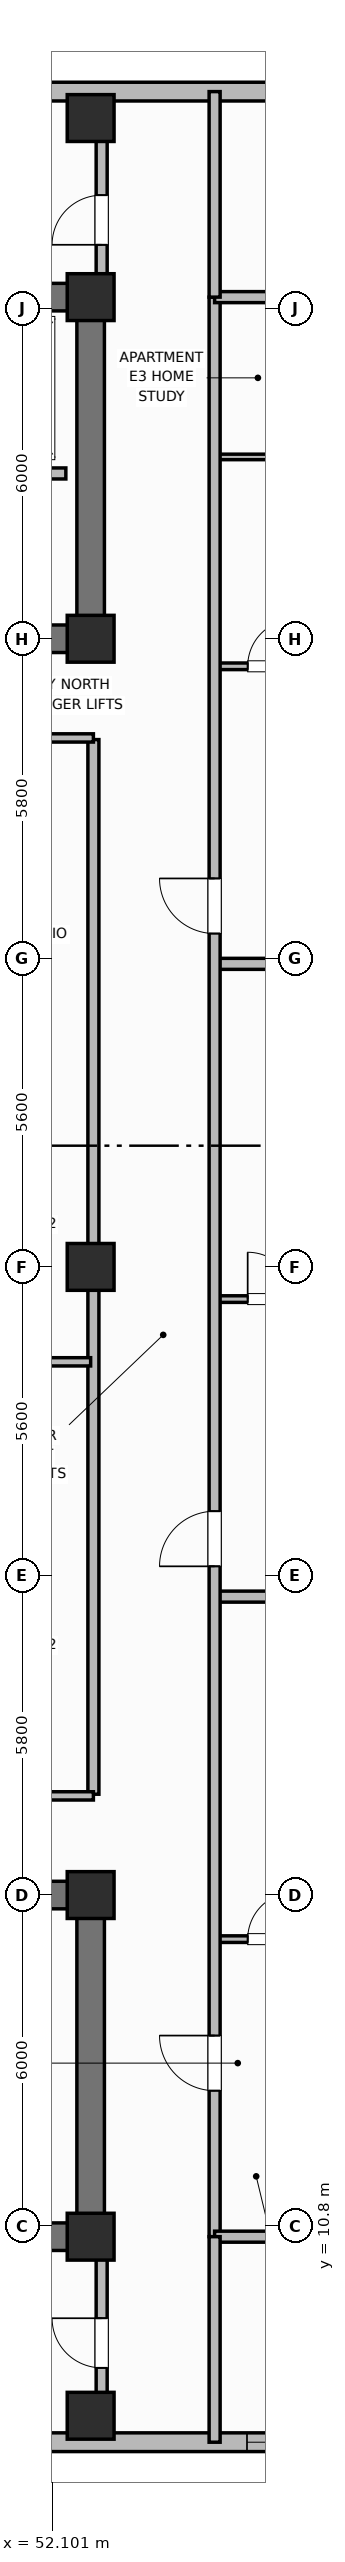
"""IFC4 building model, lengths in metres.
Left out: names, types, materials, properties, quantities, classifications, styles, units other than length and angle.
Written with IfcOpenShell. Run it as: python <this file> out.ifc"""

import sys

from ifc_helpers import new_model, si_unit, direction, frame, frame_2d, origin, origin_2d, place, context, subcontext, project, spatial, rectangle, extrude, element, fill, save


model = new_model("IFC4")
c1 = context("Model", 3, precision=1e-05, world=origin(), true_north=direction((0.0, 1.0)))
c2 = subcontext(c1, "Body", "Model", "MODEL_VIEW")
j1 = project(units=[si_unit("LENGTHUNIT", "METRE"), si_unit("PLANEANGLEUNIT", "RADIAN")], contexts=[c1])
p1 = place(None, origin())
s1 = spatial("IfcSite", under=j1, at=p1, CompositionType="ELEMENT")
p2 = place(p1, origin())
s2 = spatial("IfcBuilding", under=s1, at=p2, CompositionType="ELEMENT")
p3 = place(p2, frame((0.0, 0.0, 207.3)))
s3 = spatial("IfcBuildingStorey", under=s2, at=p3, CompositionType="ELEMENT", Elevation=207.3)
p4 = place(p3, frame((52.8, 10.6, 0.0), z_axis=(0.0, 0.0, 1.0), x_axis=(-1.0, 0.0, 0.0)))
e1 = element("IfcWall", 1, at=p4, inside=s3, PredefinedType="SHEAR", context=c2, shape_type="SweptSolid", body=[
    extrude(rectangle(XDim=27.2, YDim=0.5, at=frame_2d((13.6, 0.0))), origin(), (0.0, 0.0, 1.0), 3.7),
])
p5 = place(p3, frame((52.8, 10.85, 0.0), z_axis=(0.0, 0.0, 1.0), x_axis=(0.0, 1.0, 0.0)))
e2 = element("IfcWall", 2, at=p5, inside=s3, PredefinedType="SHEAR", context=c2, shape_type="SweptSolid", body=[
    extrude(rectangle(XDim=5.7, YDim=0.5, at=frame_2d((2.85, 0.0))), origin(), (0.0, 0.0, 1.0), 3.7),
])
p6 = place(p3, frame((25.6, 16.8, 0.0), z_axis=(0.0, 0.0, 1.0), x_axis=(1.0, 0.0, 0.0)))
e3 = element("IfcWall", 3, at=p6, inside=s3, PredefinedType="SHEAR", context=c2, shape_type="SweptSolid", body=[
    extrude(rectangle(XDim=27.2, YDim=0.5, at=frame_2d((13.6, 0.0))), origin(), (0.0, 0.0, 1.0), 3.7),
])
p7 = place(p6, frame((1.9, 0.0, 0.0)))
e4 = element("IfcOpeningElement", 4, at=p7, cuts=e3, PredefinedType="OPENING", context=c2, shape_type="SweptSolid", body=[
    extrude(rectangle(XDim=1.1, YDim=2.15, at=frame_2d((0.55, 1.075))), frame((0.0, 0.26, 0.0), z_axis=(0.0, -1.0, 0.0), x_axis=(1.0, 0.0, 0.0)), (0.0, 0.0, 1.0), 0.52),
])
p8 = place(p6, frame((13.0, 0.0, 0.0)))
e5 = element("IfcOpeningElement", 5, at=p8, cuts=e3, PredefinedType="OPENING", context=c2, shape_type="SweptSolid", body=[
    extrude(rectangle(XDim=1.2, YDim=2.15, at=frame_2d((0.6, 1.075))), frame((0.0, 0.26, 0.0), z_axis=(0.0, -1.0, 0.0), x_axis=(1.0, 0.0, 0.0)), (0.0, 0.0, 1.0), 0.52),
])
p9 = place(p6, frame((21.6, 0.0, 0.0)))
e6 = element("IfcOpeningElement", 6, at=p9, cuts=e3, PredefinedType="OPENING", context=c2, shape_type="SweptSolid", body=[
    extrude(rectangle(XDim=1.0, YDim=2.15, at=frame_2d((0.5, 1.075))), frame((0.0, 0.26, 0.0), z_axis=(0.0, -1.0, 0.0), x_axis=(1.0, 0.0, 0.0)), (0.0, 0.0, 1.0), 0.52),
])
p10 = place(p3, frame((25.6, 45.8, 0.0), z_axis=(0.0, 0.0, 1.0), x_axis=(1.0, 0.0, 0.0)))
e7 = element("IfcWall", 7, at=p10, inside=s3, PredefinedType="SHEAR", context=c2, shape_type="SweptSolid", body=[
    extrude(rectangle(XDim=27.2, YDim=0.5, at=frame_2d((13.6, 0.0))), origin(), (0.0, 0.0, 1.0), 3.7),
])
p11 = place(p3, frame((52.8, 39.85, 0.0), z_axis=(0.0, 0.0, 1.0), x_axis=(0.0, 1.0, 0.0)))
e8 = element("IfcWall", 8, at=p11, inside=s3, PredefinedType="SHEAR", context=c2, shape_type="SweptSolid", body=[
    extrude(rectangle(XDim=5.7, YDim=0.5, at=frame_2d((2.85, 0.0))), origin(), (0.0, 0.0, 1.0), 3.7),
])
p12 = place(p3, frame((52.8, 39.6, 0.0), z_axis=(0.0, 0.0, 1.0), x_axis=(-1.0, 0.0, 0.0)))
e9 = element("IfcWall", 9, at=p12, inside=s3, PredefinedType="SHEAR", context=c2, shape_type="SweptSolid", body=[
    extrude(rectangle(XDim=27.2, YDim=0.5, at=frame_2d((13.6, 0.0))), origin(), (0.0, 0.0, 1.0), 3.7),
])
p13 = place(p12, frame((24.2, 0.0, 0.0)))
e10 = element("IfcOpeningElement", 10, at=p13, cuts=e9, PredefinedType="OPENING", context=c2, shape_type="SweptSolid", body=[
    extrude(rectangle(XDim=1.1, YDim=2.15, at=frame_2d((0.55, 1.075))), frame((0.0, 0.26, 0.0), z_axis=(0.0, -1.0, 0.0), x_axis=(1.0, 0.0, 0.0)), (0.0, 0.0, 1.0), 0.52),
])
p14 = place(p12, frame((15.1, 0.0, 0.0)))
e11 = element("IfcOpeningElement", 11, at=p14, cuts=e9, PredefinedType="OPENING", context=c2, shape_type="SweptSolid", body=[
    extrude(rectangle(XDim=1.2, YDim=2.15, at=frame_2d((0.6, 1.075))), frame((0.0, 0.26, 0.0), z_axis=(0.0, -1.0, 0.0), x_axis=(1.0, 0.0, 0.0)), (0.0, 0.0, 1.0), 0.52),
])
p15 = place(p12, frame((11.6, 0.0, 0.0)))
e12 = element("IfcOpeningElement", 12, at=p15, cuts=e9, PredefinedType="OPENING", context=c2, shape_type="SweptSolid", body=[
    extrude(rectangle(XDim=0.9, YDim=2.1, at=frame_2d((0.45, 1.05))), frame((0.0, 0.26, 0.0), z_axis=(0.0, -1.0, 0.0), x_axis=(1.0, 0.0, 0.0)), (0.0, 0.0, 1.0), 0.52),
])
p16 = place(p12, frame((7.35, 0.0, 0.0)))
e13 = element("IfcOpeningElement", 13, at=p16, cuts=e9, PredefinedType="OPENING", context=c2, shape_type="SweptSolid", body=[
    extrude(rectangle(XDim=0.85, YDim=2.1, at=frame_2d((0.425, 1.05))), frame((0.0, 0.26, 0.0), z_axis=(0.0, -1.0, 0.0), x_axis=(1.0, 0.0, 0.0)), (0.0, 0.0, 1.0), 0.52),
])
p17 = place(p12, frame((4.2, 0.0, 0.0)))
e14 = element("IfcOpeningElement", 14, at=p17, cuts=e9, PredefinedType="OPENING", context=c2, shape_type="SweptSolid", body=[
    extrude(rectangle(XDim=1.3, YDim=2.2, at=frame_2d((0.65, 1.1))), frame((0.0, 0.26, 0.0), z_axis=(0.0, -1.0, 0.0), x_axis=(1.0, 0.0, 0.0)), (0.0, 0.0, 1.0), 0.52),
])
for number, where, z_axis, x_axis in (
    (15, (52.8, 10.6, 0.0), (0.0, 0.0, 1.0), (1.0, 0.0, 0.0)),
    (16, (52.8, 16.8, 0.0), (0.0, 0.0, 1.0), (1.0, 0.0, 0.0)),
    (17, (52.8, 39.6, 0.0), (0.0, 0.0, 1.0), (1.0, 0.0, 0.0)),
    (18, (52.8, 45.8, 0.0), (0.0, 0.0, 1.0), (1.0, 0.0, 0.0)),
    (19, (52.8, 28.2, 0.0), (0.0, 0.0, 1.0), (1.0, 0.0, 0.0)),
    (20, (52.8, 7.35, 0.0), (0.0, 0.0, 1.0), (1.0, 0.0, 0.0)),
    (21, (52.8, 49.05, 0.0), (0.0, 0.0, 1.0), (1.0, 0.0, 0.0)),
):
    element("IfcColumn", number, at=place(p3, frame(where, z_axis=z_axis, x_axis=x_axis)), inside=s3, PredefinedType="COLUMN", context=c2, shape_type="SweptSolid", body=[
        extrude(rectangle(XDim=0.85, YDim=0.85, at=origin_2d()), origin(), (0.0, 0.0, 1.0), 3.7),
    ])
p18 = place(p3, frame((42.4, 6.87, 0.0), z_axis=(0.0, 0.0, 1.0), x_axis=(1.0, 0.0, 0.0)))
e22 = element("IfcWall", 22, at=p18, inside=s3, PredefinedType="SOLIDWALL", context=c2, shape_type="SweptSolid", body=[
    extrude(rectangle(XDim=15.8, YDim=0.34, at=frame_2d((7.9, 0.0))), origin(), (0.0, 0.0, 1.0), 2.72),
])
p19 = place(p18, frame((2.363, 0.0, 0.7)))
e23 = element("IfcOpeningElement", 23, at=p19, cuts=e22, PredefinedType="OPENING", context=c2, shape_type="SweptSolid", body=[
    extrude(rectangle(XDim=1.6, YDim=1.9, at=frame_2d((0.8, 0.95))), frame((0.0, 0.18, 0.0), z_axis=(0.0, -1.0, 0.0), x_axis=(1.0, 0.0, 0.0)), (0.0, 0.0, 1.0), 0.36),
])
p20 = place(p18, frame((5.288, 0.0, 0.7)))
e24 = element("IfcOpeningElement", 24, at=p20, cuts=e22, PredefinedType="OPENING", context=c2, shape_type="SweptSolid", body=[
    extrude(rectangle(XDim=1.6, YDim=1.9, at=frame_2d((0.8, 0.95))), frame((0.0, 0.18, 0.0), z_axis=(0.0, -1.0, 0.0), x_axis=(1.0, 0.0, 0.0)), (0.0, 0.0, 1.0), 0.36),
])
p21 = place(p18, frame((13.238, 0.0, 0.7)))
e25 = element("IfcOpeningElement", 25, at=p21, cuts=e22, PredefinedType="OPENING", context=c2, shape_type="SweptSolid", body=[
    extrude(rectangle(XDim=1.6, YDim=1.9, at=frame_2d((0.8, 0.95))), frame((0.0, 0.18, 0.0), z_axis=(0.0, -1.0, 0.0), x_axis=(1.0, 0.0, 0.0)), (0.0, 0.0, 1.0), 0.36),
])
p22 = place(p3, frame((58.2, 49.53, 0.0), z_axis=(0.0, 0.0, 1.0), x_axis=(-1.0, 0.0, 0.0)))
e26 = element("IfcWall", 26, at=p22, inside=s3, PredefinedType="SOLIDWALL", context=c2, shape_type="SweptSolid", body=[
    extrude(rectangle(XDim=15.8, YDim=0.34, at=frame_2d((7.9, 0.0))), origin(), (0.0, 0.0, 1.0), 2.72),
])
p23 = place(p22, frame((7.962, 0.0, 0.7)))
e27 = element("IfcOpeningElement", 27, at=p23, cuts=e26, PredefinedType="OPENING", context=c2, shape_type="SweptSolid", body=[
    extrude(rectangle(XDim=2.1, YDim=1.9, at=frame_2d((1.05, 0.95))), frame((0.0, 0.18, 0.0), z_axis=(0.0, -1.0, 0.0), x_axis=(1.0, 0.0, 0.0)), (0.0, 0.0, 1.0), 0.36),
])
p24 = place(p22, frame((11.587, 0.0, 0.7)))
e28 = element("IfcOpeningElement", 28, at=p24, cuts=e26, PredefinedType="OPENING", context=c2, shape_type="SweptSolid", body=[
    extrude(rectangle(XDim=2.1, YDim=1.9, at=frame_2d((1.05, 0.95))), frame((0.0, 0.18, 0.0), z_axis=(0.0, -1.0, 0.0), x_axis=(1.0, 0.0, 0.0)), (0.0, 0.0, 1.0), 0.36),
])
p25 = place(p3, frame((52.35, 42.6, 0.0), z_axis=(0.0, 0.0, 1.0), x_axis=(-1.0, 0.0, 0.0)))
e29 = element("IfcWall", 29, at=p25, inside=s3, PredefinedType="PARTITIONING", context=c2, shape_type="SweptSolid", body=[
    extrude(rectangle(XDim=6.5, YDim=0.2, at=frame_2d((3.25, 0.0))), origin(), (0.0, 0.0, 1.0), 2.55),
])
p26 = place(p25, frame((4.9, 0.0, 0.0)))
e30 = element("IfcOpeningElement", 30, at=p26, cuts=e29, PredefinedType="OPENING", context=c2, shape_type="SweptSolid", body=[
    extrude(rectangle(XDim=1.0, YDim=2.15, at=frame_2d((0.5, 1.075))), frame((0.0, 0.11, 0.0), z_axis=(0.0, -1.0, 0.0), x_axis=(1.0, 0.0, 0.0)), (0.0, 0.0, 1.0), 0.22),
])
p27 = place(p25, frame((2.8, 0.0, 0.0)))
e31 = element("IfcOpeningElement", 31, at=p27, cuts=e29, PredefinedType="OPENING", context=c2, shape_type="SweptSolid", body=[
    extrude(rectangle(XDim=1.0, YDim=2.15, at=frame_2d((0.5, 1.075))), frame((0.0, 0.11, 0.0), z_axis=(0.0, -1.0, 0.0), x_axis=(1.0, 0.0, 0.0)), (0.0, 0.0, 1.0), 0.22),
])
p28 = place(p25, frame((0.7, 0.0, 0.0)))
e32 = element("IfcOpeningElement", 32, at=p28, cuts=e29, PredefinedType="OPENING", context=c2, shape_type="SweptSolid", body=[
    extrude(rectangle(XDim=1.0, YDim=2.15, at=frame_2d((0.5, 1.075))), frame((0.0, 0.11, 0.0), z_axis=(0.0, -1.0, 0.0), x_axis=(1.0, 0.0, 0.0)), (0.0, 0.0, 1.0), 0.22),
])
p29 = place(p3, frame((52.85, 18.63, 0.0), z_axis=(0.0, 0.0, 1.0), x_axis=(0.0, 1.0, 0.0)))
e33 = element("IfcWall", 33, at=p29, inside=s3, PredefinedType="PARTITIONING", context=c2, shape_type="SweptSolid", body=[
    extrude(rectangle(XDim=19.14, YDim=0.2, at=frame_2d((9.57, 0.0))), origin(), (0.0, 0.0, 1.0), 2.55),
])
for number, where, z_axis, x_axis in (
    (34, (50.05, 18.6, 0.0), (0.0, 0.0, 1.0), (1.0, 0.0, 0.0)),
    (35, (50.05, 37.8, 0.0), (0.0, 0.0, 1.0), (1.0, 0.0, 0.0)),
):
    element("IfcWall", number, at=place(p3, frame(where, z_axis=z_axis, x_axis=x_axis)), inside=s3, PredefinedType="PARTITIONING", context=c2, shape_type="SweptSolid", body=[
        extrude(rectangle(XDim=2.8, YDim=0.15, at=frame_2d((1.4, 0.0))), origin(), (0.0, 0.0, 1.0), 2.55),
    ])
p30 = place(p3, frame((50.08, 26.477, 0.0), z_axis=(0.0, 0.0, 1.0), x_axis=(1.0, 0.0, 0.0)))
e36 = element("IfcWall", 36, at=p30, inside=s3, PredefinedType="PARTITIONING", context=c2, shape_type="SweptSolid", body=[
    extrude(rectangle(XDim=2.72, YDim=0.15, at=frame_2d((1.36, 0.0))), origin(), (0.0, 0.0, 1.0), 2.55),
])
p31 = place(p3, frame((55.05, 16.0, 0.0), z_axis=(0.0, 0.0, 1.0), x_axis=(1.0, 0.0, 0.0)))
e37 = element("IfcWall", 37, at=p31, inside=s3, PredefinedType="PARTITIONING", context=c2, shape_type="SweptSolid", body=[
    extrude(rectangle(XDim=2.25, YDim=0.12, at=frame_2d((1.125, 0.0))), origin(), (0.0, 0.0, 1.0), 2.55),
])
p32 = place(p31, frame((0.6, 0.0, 0.0)))
e38 = element("IfcOpeningElement", 38, at=p32, cuts=e37, PredefinedType="OPENING", context=c2, shape_type="SweptSolid", body=[
    extrude(rectangle(XDim=0.85, YDim=2.1, at=frame_2d((0.425, 1.05))), frame((0.0, 0.07, 0.0), z_axis=(0.0, -1.0, 0.0), x_axis=(1.0, 0.0, 0.0)), (0.0, 0.0, 1.0), 0.14),
])
p33 = place(p3, frame((55.05, 22.216, 0.0), z_axis=(0.0, 0.0, 1.0), x_axis=(1.0, 0.0, 0.0)))
e39 = element("IfcWall", 39, at=p33, inside=s3, PredefinedType="PARTITIONING", context=c2, shape_type="SweptSolid", body=[
    extrude(rectangle(XDim=6.78, YDim=0.2, at=frame_2d((3.39, 0.0))), origin(), (0.0, 0.0, 1.0), 2.55),
])
p34 = place(p3, frame((55.05, 27.616, 0.0), z_axis=(0.0, 0.0, 1.0), x_axis=(1.0, 0.0, 0.0)))
e40 = element("IfcWall", 40, at=p34, inside=s3, PredefinedType="PARTITIONING", context=c2, shape_type="SweptSolid", body=[
    extrude(rectangle(XDim=2.25, YDim=0.12, at=frame_2d((1.125, 0.0))), origin(), (0.0, 0.0, 1.0), 2.55),
])
p35 = place(p34, frame((0.6, 0.0, 0.0)))
e41 = element("IfcOpeningElement", 41, at=p35, cuts=e40, PredefinedType="OPENING", context=c2, shape_type="SweptSolid", body=[
    extrude(rectangle(XDim=0.85, YDim=2.1, at=frame_2d((0.425, 1.05))), frame((0.0, 0.07, 0.0), z_axis=(0.0, -1.0, 0.0), x_axis=(1.0, 0.0, 0.0)), (0.0, 0.0, 1.0), 0.14),
])
p36 = place(p3, frame((55.05, 33.7, 0.0), z_axis=(0.0, 0.0, 1.0), x_axis=(1.0, 0.0, 0.0)))
e42 = element("IfcWall", 42, at=p36, inside=s3, PredefinedType="PARTITIONING", context=c2, shape_type="SweptSolid", body=[
    extrude(rectangle(XDim=6.78, YDim=0.2, at=frame_2d((3.39, 0.0))), origin(), (0.0, 0.0, 1.0), 2.55),
])
p37 = place(p3, frame((55.05, 39.1, 0.0), z_axis=(0.0, 0.0, 1.0), x_axis=(1.0, 0.0, 0.0)))
e43 = element("IfcWall", 43, at=p37, inside=s3, PredefinedType="PARTITIONING", context=c2, shape_type="SweptSolid", body=[
    extrude(rectangle(XDim=2.25, YDim=0.12, at=frame_2d((1.125, 0.0))), origin(), (0.0, 0.0, 1.0), 2.55),
])
p38 = place(p37, frame((0.6, 0.0, 0.0)))
e44 = element("IfcOpeningElement", 44, at=p38, cuts=e43, PredefinedType="OPENING", context=c2, shape_type="SweptSolid", body=[
    extrude(rectangle(XDim=0.85, YDim=2.1, at=frame_2d((0.425, 1.05))), frame((0.0, 0.07, 0.0), z_axis=(0.0, -1.0, 0.0), x_axis=(1.0, 0.0, 0.0)), (0.0, 0.0, 1.0), 0.14),
])
p39 = place(p3, frame((55.05, 42.9, 0.0), z_axis=(0.0, 0.0, 1.0), x_axis=(1.0, 0.0, 0.0)))
e45 = element("IfcWall", 45, at=p39, inside=s3, PredefinedType="PARTITIONING", context=c2, shape_type="SweptSolid", body=[
    extrude(rectangle(XDim=2.25, YDim=0.1, at=frame_2d((1.125, 0.0))), origin(), (0.0, 0.0, 1.0), 2.55),
])
p40 = place(p3, frame((55.05, 10.6, 0.0), z_axis=(0.0, 0.0, 1.0), x_axis=(0.0, 1.0, 0.0)))
e46 = element("IfcWall", 46, at=p40, inside=s3, PredefinedType="PARTITIONING", context=c2, shape_type="SweptSolid", body=[
    extrude(rectangle(XDim=35.2, YDim=0.2, at=frame_2d((17.6, 0.0))), origin(), (0.0, 0.0, 1.0), 2.55),
])
p41 = place(p40, frame((2.65, 0.0, 0.0)))
e47 = element("IfcOpeningElement", 47, at=p41, cuts=e46, PredefinedType="OPENING", context=c2, shape_type="SweptSolid", body=[
    extrude(rectangle(XDim=1.0, YDim=2.15, at=frame_2d((0.5, 1.075))), frame((0.0, 0.11, 0.0), z_axis=(0.0, -1.0, 0.0), x_axis=(1.0, 0.0, 0.0)), (0.0, 0.0, 1.0), 0.22),
])
p42 = place(p40, frame((12.166, 0.0, 0.0)))
e48 = element("IfcOpeningElement", 48, at=p42, cuts=e46, PredefinedType="OPENING", context=c2, shape_type="SweptSolid", body=[
    extrude(rectangle(XDim=1.0, YDim=2.15, at=frame_2d((0.5, 1.075))), frame((0.0, 0.11, 0.0), z_axis=(0.0, -1.0, 0.0), x_axis=(1.0, 0.0, 0.0)), (0.0, 0.0, 1.0), 0.22),
])
p43 = place(p40, frame((23.65, 0.0, 0.0)))
e49 = element("IfcOpeningElement", 49, at=p43, cuts=e46, PredefinedType="OPENING", context=c2, shape_type="SweptSolid", body=[
    extrude(rectangle(XDim=1.0, YDim=2.15, at=frame_2d((0.5, 1.075))), frame((0.0, 0.11, 0.0), z_axis=(0.0, -1.0, 0.0), x_axis=(1.0, 0.0, 0.0)), (0.0, 0.0, 1.0), 0.22),
])
for number, where, z_axis, x_axis in (
    (50, (55.05, 10.6, 0.0), (0.0, 0.0, 1.0), (1.0, 0.0, 0.0)),
    (51, (55.05, 45.8, 0.0), (0.0, 0.0, 1.0), (1.0, 0.0, 0.0)),
):
    element("IfcWall", number, at=place(p3, frame(where, z_axis=z_axis, x_axis=x_axis)), inside=s3, PredefinedType="PARTITIONING", context=c2, shape_type="SweptSolid", body=[
        extrude(rectangle(XDim=6.36, YDim=0.2, at=frame_2d((3.18, 0.0))), origin(), (0.0, 0.0, 1.0), 2.55),
    ])
for number, where, z_axis, x_axis in (
    (52, (55.05, 6.87, 0.0), (0.0, 0.0, 1.0), (0.0, 1.0, 0.0)),
    (53, (55.05, 45.8, 0.0), (0.0, 0.0, 1.0), (0.0, 1.0, 0.0)),
):
    element("IfcWall", number, at=place(p3, frame(where, z_axis=z_axis, x_axis=x_axis)), inside=s3, PredefinedType="PARTITIONING", context=c2, shape_type="SweptSolid", body=[
        extrude(rectangle(XDim=3.73, YDim=0.2, at=frame_2d((1.865, 0.0))), origin(), (0.0, 0.0, 1.0), 2.55),
    ])
p44 = place(p3, frame((53.0, 7.57, 0.0), z_axis=(0.0, 0.0, 1.0), x_axis=(0.0, 1.0, 0.0)))
e54 = element("IfcWall", 54, at=p44, inside=s3, PredefinedType="PARTITIONING", context=c2, shape_type="SweptSolid", body=[
    extrude(rectangle(XDim=2.73, YDim=0.2, at=frame_2d((1.365, 0.0))), origin(), (0.0, 0.0, 1.0), 2.55),
])
p45 = place(p44, frame((0.65, 0.0, 0.0)))
e55 = element("IfcOpeningElement", 55, at=p45, cuts=e54, PredefinedType="OPENING", context=c2, shape_type="SweptSolid", body=[
    extrude(rectangle(XDim=0.9, YDim=2.1, at=frame_2d((0.45, 1.05))), frame((0.0, 0.11, 0.0), z_axis=(0.0, -1.0, 0.0), x_axis=(1.0, 0.0, 0.0)), (0.0, 0.0, 1.0), 0.22),
])
p46 = place(p3, frame((53.0, 46.1, 0.0), z_axis=(0.0, 0.0, 1.0), x_axis=(0.0, 1.0, 0.0)))
e56 = element("IfcWall", 56, at=p46, inside=s3, PredefinedType="PARTITIONING", context=c2, shape_type="SweptSolid", body=[
    extrude(rectangle(XDim=2.73, YDim=0.2, at=frame_2d((1.365, 0.0))), origin(), (0.0, 0.0, 1.0), 2.55),
])
p47 = place(p46, frame((0.65, 0.0, 0.0)))
e57 = element("IfcOpeningElement", 57, at=p47, cuts=e56, PredefinedType="OPENING", context=c2, shape_type="SweptSolid", body=[
    extrude(rectangle(XDim=0.9, YDim=2.1, at=frame_2d((0.45, 1.05))), frame((0.0, 0.11, 0.0), z_axis=(0.0, -1.0, 0.0), x_axis=(1.0, 0.0, 0.0)), (0.0, 0.0, 1.0), 0.22),
])
p48 = place(p21, origin())
e58 = element("IfcWindow", 58, at=p48, inside=s3, PartitioningType="SINGLE_PANEL", PredefinedType="WINDOW", context=c2, shape_type="SweptSolid", body=[
    extrude(rectangle(XDim=1.6, YDim=1.9, at=frame_2d((0.8, 0.95))), frame((0.0, 0.03, 0.0), z_axis=(0.0, -1.0, 0.0), x_axis=(1.0, 0.0, 0.0)), (0.0, 0.0, 1.0), 0.06),
])
fill(e25, e58)
p49 = place(p32, origin())
e59 = element("IfcDoor", 59, at=p49, inside=s3, OperationType="SINGLE_SWING_RIGHT", PredefinedType="DOOR", context=c2, shape_type="SweptSolid", body=[
    extrude(rectangle(XDim=0.85, YDim=2.1, at=frame_2d((0.425, 1.05))), frame((0.0, 0.025, 0.0), z_axis=(0.0, -1.0, 0.0), x_axis=(1.0, 0.0, 0.0)), (0.0, 0.0, 1.0), 0.05),
])
fill(e38, e59)
p50 = place(p35, origin())
e60 = element("IfcDoor", 60, at=p50, inside=s3, OperationType="SINGLE_SWING_LEFT", PredefinedType="DOOR", context=c2, shape_type="SweptSolid", body=[
    extrude(rectangle(XDim=0.85, YDim=2.1, at=frame_2d((0.425, 1.05))), frame((0.0, 0.025, 0.0), z_axis=(0.0, -1.0, 0.0), x_axis=(1.0, 0.0, 0.0)), (0.0, 0.0, 1.0), 0.05),
])
fill(e41, e60)
p51 = place(p38, origin())
e61 = element("IfcDoor", 61, at=p51, inside=s3, OperationType="SINGLE_SWING_RIGHT", PredefinedType="DOOR", context=c2, shape_type="SweptSolid", body=[
    extrude(rectangle(XDim=0.85, YDim=2.1, at=frame_2d((0.425, 1.05))), frame((0.0, 0.025, 0.0), z_axis=(0.0, -1.0, 0.0), x_axis=(1.0, 0.0, 0.0)), (0.0, 0.0, 1.0), 0.05),
])
fill(e44, e61)
p52 = place(p41, origin())
e62 = element("IfcDoor", 62, at=p52, inside=s3, OperationType="SINGLE_SWING_RIGHT", PredefinedType="DOOR", context=c2, shape_type="SweptSolid", body=[
    extrude(rectangle(XDim=1.0, YDim=2.15, at=frame_2d((0.5, 1.075))), frame((0.0, 0.025, 0.0), z_axis=(0.0, -1.0, 0.0), x_axis=(1.0, 0.0, 0.0)), (0.0, 0.0, 1.0), 0.05),
])
fill(e47, e62)
p53 = place(p42, origin())
e63 = element("IfcDoor", 63, at=p53, inside=s3, OperationType="SINGLE_SWING_LEFT", PredefinedType="DOOR", context=c2, shape_type="SweptSolid", body=[
    extrude(rectangle(XDim=1.0, YDim=2.15, at=frame_2d((0.5, 1.075))), frame((0.0, 0.025, 0.0), z_axis=(0.0, -1.0, 0.0), x_axis=(1.0, 0.0, 0.0)), (0.0, 0.0, 1.0), 0.05),
])
fill(e48, e63)
p54 = place(p43, origin())
e64 = element("IfcDoor", 64, at=p54, inside=s3, OperationType="SINGLE_SWING_RIGHT", PredefinedType="DOOR", context=c2, shape_type="SweptSolid", body=[
    extrude(rectangle(XDim=1.0, YDim=2.15, at=frame_2d((0.5, 1.075))), frame((0.0, 0.025, 0.0), z_axis=(0.0, -1.0, 0.0), x_axis=(1.0, 0.0, 0.0)), (0.0, 0.0, 1.0), 0.05),
])
fill(e49, e64)
p55 = place(p45, origin())
e65 = element("IfcDoor", 65, at=p55, inside=s3, OperationType="SINGLE_SWING_RIGHT", PredefinedType="DOOR", context=c2, shape_type="SweptSolid", body=[
    extrude(rectangle(XDim=0.9, YDim=2.1, at=frame_2d((0.45, 1.05))), frame((0.0, 0.025, 0.0), z_axis=(0.0, -1.0, 0.0), x_axis=(1.0, 0.0, 0.0)), (0.0, 0.0, 1.0), 0.05),
])
fill(e55, e65)
p56 = place(p47, origin())
e66 = element("IfcDoor", 66, at=p56, inside=s3, OperationType="SINGLE_SWING_LEFT", PredefinedType="DOOR", context=c2, shape_type="SweptSolid", body=[
    extrude(rectangle(XDim=0.9, YDim=2.1, at=frame_2d((0.45, 1.05))), frame((0.0, 0.025, 0.0), z_axis=(0.0, -1.0, 0.0), x_axis=(1.0, 0.0, 0.0)), (0.0, 0.0, 1.0), 0.05),
])
fill(e57, e66)
save(model, sys.argv[1])
